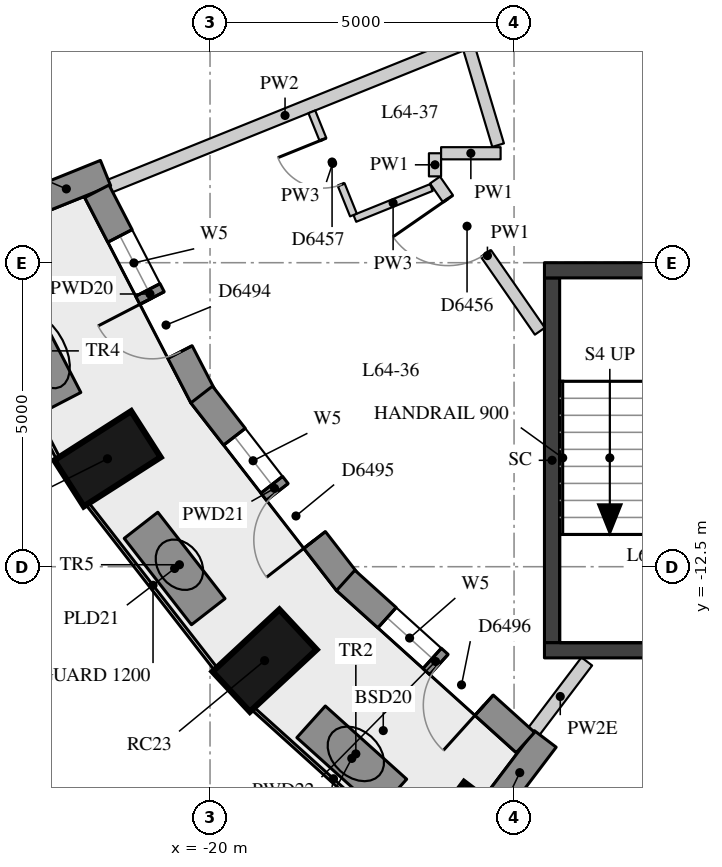
"""IFC4 building model, lengths in metres.
Left out: names, types, materials, properties, quantities, classifications, styles, units other than length and angle.
Written with IfcOpenShell. Run it as: python <this file> out.ifc"""

import sys

from ifc_helpers import new_model, si_unit, direction, frame, frame_2d, origin, origin_2d, place, context, subcontext, project, spatial, rectangle, extrude, element, fill, save


model = new_model("IFC4")
c1 = context("Model", 3, precision=1e-05, world=origin(), true_north=direction((0.0, 1.0)))
c2 = subcontext(c1, "Body", "Model", "MODEL_VIEW")
j1 = project(units=[si_unit("LENGTHUNIT", "METRE"), si_unit("PLANEANGLEUNIT", "RADIAN")], contexts=[c1])
p1 = place(None, origin())
s1 = spatial("IfcSite", under=j1, at=p1, CompositionType="ELEMENT")
p2 = place(p1, origin())
s2 = spatial("IfcBuilding", under=s1, at=p2, CompositionType="ELEMENT")
p3 = place(p2, frame((0.0, 0.0, 225.5)))
s3 = spatial("IfcBuildingStorey", under=s2, at=p3, CompositionType="ELEMENT", Elevation=225.5)
for number, where, z_axis, x_axis in (
    (1, (-21.687, -10.725, 0.0), (0.0, 0.0, 1.0), (-0.842, -0.539, 0.0)),
    (2, (-19.102, -14.045, 0.0), (0.0, 0.0, 1.0), (-0.732, -0.681, 0.0)),
    (3, (-15.916, -16.911, 0.0), (0.0, 0.0, 1.0), (-0.604, -0.797, 0.0)),
):
    element("IfcColumn", number, at=place(p3, frame(where, z_axis=z_axis, x_axis=x_axis)), inside=s3, PredefinedType="COLUMN", context=c2, shape_type="SweptSolid", body=[
        extrude(rectangle(XDim=1.5, YDim=0.9, at=origin_2d()), origin(), (0.0, 0.0, 1.0), 3.3),
    ])
p4 = place(p3, frame((-23.008, -6.546, 0.0), z_axis=(0.0, 0.0, 1.0), x_axis=(0.927346156366, 0.37420463155, 0.0)))
e4 = element("IfcWall", 4, at=p4, inside=s3, PredefinedType="SOLIDWALL", context=c2, shape_type="SweptSolid", body=[
    extrude(rectangle(XDim=1.39, YDim=0.45, at=frame_2d((0.695, 0.0))), origin(), (0.0, 0.0, 1.0), 2.85),
])
p5 = place(p3, frame((-15.326, -16.442, 0.0), z_axis=(0.0, 0.0, 1.0), x_axis=(0.603644757989, 0.797253414011, 0.0)))
e5 = element("IfcWall", 5, at=p5, inside=s3, PredefinedType="SOLIDWALL", context=c2, shape_type="SweptSolid", body=[
    extrude(rectangle(XDim=1.391, YDim=0.45, at=frame_2d((0.695, 0.0))), origin(), (0.0, 0.0, 1.0), 2.4),
])
p6 = place(p3, frame((-21.861, -6.326, 0.0), z_axis=(0.0, 0.0, 1.0), x_axis=(0.45924645187, -0.888308896975, 0.0)))
e6 = element("IfcWall", 6, at=p6, inside=s3, PredefinedType="SOLIDWALL", context=c2, shape_type="SweptSolid", body=[
    extrude(rectangle(XDim=3.802, YDim=0.45, at=frame_2d((1.901, 0.0))), origin(), (0.0, 0.0, 1.0), 2.85),
])
p7 = place(p6, frame((0.826, 0.0, 0.4)))
e7 = element("IfcOpeningElement", 7, at=p7, cuts=e6, PredefinedType="OPENING", context=c2, shape_type="SweptSolid", body=[
    extrude(rectangle(XDim=1.0, YDim=1.75, at=frame_2d((0.5, 0.875))), frame((0.0, 0.235, 0.0), z_axis=(0.0, -1.0, 0.0), x_axis=(1.0, 0.0, 0.0)), (0.0, 0.0, 1.0), 0.47),
])
p8 = place(p6, frame((1.976, 0.0, 0.0)))
e8 = element("IfcOpeningElement", 8, at=p8, cuts=e6, PredefinedType="OPENING", context=c2, shape_type="SweptSolid", body=[
    extrude(rectangle(XDim=1.0, YDim=2.15, at=frame_2d((0.5, 1.075))), frame((0.0, 0.235, 0.0), z_axis=(0.0, -1.0, 0.0), x_axis=(1.0, 0.0, 0.0)), (0.0, 0.0, 1.0), 0.47),
])
p9 = place(p3, frame((-20.137, -9.668, 0.0), z_axis=(0.0, 0.0, 1.0), x_axis=(0.613157177014, -0.789960933386, 0.0)))
e9 = element("IfcWall", 9, at=p9, inside=s3, PredefinedType="SOLIDWALL", context=c2, shape_type="SweptSolid", body=[
    extrude(rectangle(XDim=3.906, YDim=0.45, at=frame_2d((1.953, 0.0))), origin(), (0.0, 0.0, 1.0), 2.85),
])
p10 = place(p9, frame((0.878, 0.0, 0.4)))
e10 = element("IfcOpeningElement", 10, at=p10, cuts=e9, PredefinedType="OPENING", context=c2, shape_type="SweptSolid", body=[
    extrude(rectangle(XDim=1.0, YDim=1.75, at=frame_2d((0.5, 0.875))), frame((0.0, 0.235, 0.0), z_axis=(0.0, -1.0, 0.0), x_axis=(1.0, 0.0, 0.0)), (0.0, 0.0, 1.0), 0.47),
])
p11 = place(p9, frame((2.028, 0.0, 0.0)))
e11 = element("IfcOpeningElement", 11, at=p11, cuts=e9, PredefinedType="OPENING", context=c2, shape_type="SweptSolid", body=[
    extrude(rectangle(XDim=1.0, YDim=2.15, at=frame_2d((0.5, 1.075))), frame((0.0, 0.235, 0.0), z_axis=(0.0, -1.0, 0.0), x_axis=(1.0, 0.0, 0.0)), (0.0, 0.0, 1.0), 0.47),
])
p12 = place(p3, frame((-17.769, -12.725, 0.0), z_axis=(0.0, 0.0, 1.0), x_axis=(0.742485377568, -0.669862272484, 0.0)))
e12 = element("IfcWall", 12, at=p12, inside=s3, PredefinedType="SOLIDWALL", context=c2, shape_type="SweptSolid", body=[
    extrude(rectangle(XDim=3.98, YDim=0.45, at=frame_2d((1.99, 0.0))), origin(), (0.0, 0.0, 1.0), 2.85),
])
p13 = place(p12, frame((0.915, 0.0, 0.4)))
e13 = element("IfcOpeningElement", 13, at=p13, cuts=e12, PredefinedType="OPENING", context=c2, shape_type="SweptSolid", body=[
    extrude(rectangle(XDim=1.0, YDim=1.75, at=frame_2d((0.5, 0.875))), frame((0.0, 0.235, 0.0), z_axis=(0.0, -1.0, 0.0), x_axis=(1.0, 0.0, 0.0)), (0.0, 0.0, 1.0), 0.47),
])
p14 = place(p12, frame((2.065, 0.0, 0.0)))
e14 = element("IfcOpeningElement", 14, at=p14, cuts=e12, PredefinedType="OPENING", context=c2, shape_type="SweptSolid", body=[
    extrude(rectangle(XDim=1.0, YDim=2.15, at=frame_2d((0.5, 1.075))), frame((0.0, 0.235, 0.0), z_axis=(0.0, -1.0, 0.0), x_axis=(1.0, 0.0, 0.0)), (0.0, 0.0, 1.0), 0.47),
])
for number, where, z_axis, x_axis in (
    (15, (-23.264, -8.197, 0.0), (0.0, 0.0, 1.0), (0.46, -0.888, 0.0)),
    (16, (-21.135, -11.819, 0.0), (0.0, 0.0, 1.0), (0.614, -0.789, 0.0)),
    (17, (-18.338, -15.051, 0.0), (0.0, 0.0, 1.0), (0.743, -0.669, 0.0)),
):
    element("IfcWall", number, at=place(p3, frame(where, z_axis=z_axis, x_axis=x_axis)), inside=s3, PredefinedType="USERDEFINED", context=c2, shape_type="SweptSolid", body=[
        extrude(rectangle(XDim=1.8, YDim=0.7, at=frame_2d((0.9, 0.0))), origin(), (0.0, 0.0, 1.0), 0.75),
    ])
p15 = place(p3, frame((-14.375, -13.75, -0.28), z_axis=(0.0, 0.0, 1.0), x_axis=(0.0, 1.0, 0.0)))
e18 = element("IfcWall", 18, at=p15, inside=s3, PredefinedType="SHEAR", context=c2, shape_type="SweptSolid", body=[
    extrude(rectangle(XDim=6.0, YDim=0.25, at=frame_2d((3.0, 0.0))), origin(), (0.0, 0.0, 1.0), 3.13),
])
for number, where, z_axis, x_axis in (
    (19, (-14.5, -7.625, -0.28), (0.0, 0.0, 1.0), (1.0, 0.0, 0.0)),
    (20, (-14.5, -13.875, -0.28), (0.0, 0.0, 1.0), (1.0, 0.0, 0.0)),
):
    element("IfcWall", number, at=place(p3, frame(where, z_axis=z_axis, x_axis=x_axis)), inside=s3, PredefinedType="SHEAR", context=c2, shape_type="SweptSolid", body=[
        extrude(rectangle(XDim=5.2, YDim=0.25, at=frame_2d((2.6, 0.0))), origin(), (0.0, 0.0, 1.0), 3.13),
    ])
p16 = place(p3, frame((-14.575, -8.627, 0.0), z_axis=(0.0, 0.0, 1.0), x_axis=(-0.569910381143, 0.821706856163, 0.0)))
e21 = element("IfcWall", 21, at=p16, inside=s3, PredefinedType="PARTITIONING", context=c2, shape_type="SweptSolid", body=[
    extrude(rectangle(XDim=3.026, YDim=0.2, at=frame_2d((1.513, 0.0))), origin(), (0.0, 0.0, 1.0), 2.85),
])
p17 = place(p16, frame((1.552, 0.0, 0.0)))
e22 = element("IfcOpeningElement", 22, at=p17, cuts=e21, PredefinedType="OPENING", context=c2, shape_type="SweptSolid", body=[
    extrude(rectangle(XDim=1.1, YDim=2.1, at=frame_2d((0.55, 1.05))), frame((0.0, 0.11, 0.0), z_axis=(0.0, -1.0, 0.0), x_axis=(1.0, 0.0, 0.0)), (0.0, 0.0, 1.0), 0.22),
])
p18 = place(p3, frame((-16.3, -6.08, 0.0), z_axis=(0.0, 0.0, 1.0), x_axis=(0.0, 1.0, 0.0)))
e23 = element("IfcWall", 23, at=p18, inside=s3, PredefinedType="PARTITIONING", context=c2, shape_type="SweptSolid", body=[
    extrude(rectangle(XDim=0.38, YDim=0.2, at=frame_2d((0.19, 0.0))), origin(), (0.0, 0.0, 1.0), 2.85),
])
p19 = place(p3, frame((-16.2, -5.7, 0.0), z_axis=(0.0, 0.0, 1.0), x_axis=(1.0, 0.0, 0.0)))
e24 = element("IfcWall", 24, at=p19, inside=s3, PredefinedType="PARTITIONING", context=c2, shape_type="SweptSolid", body=[
    extrude(rectangle(XDim=0.979, YDim=0.2, at=frame_2d((0.489, 0.0))), origin(), (0.0, 0.0, 1.0), 2.85),
])
p20 = place(p3, frame((-15.262, -5.567, 0.0), z_axis=(0.0, 0.0, 1.0), x_axis=(-0.28704593875, 0.957916817395, 0.0)))
e25 = element("IfcWall", 25, at=p20, inside=s3, PredefinedType="PARTITIONING", context=c2, shape_type="SweptSolid", body=[
    extrude(rectangle(XDim=6.751, YDim=0.2, at=frame_2d((3.375, 0.0))), origin(), (0.0, 0.0, 1.0), 2.85),
])
p21 = place(p20, frame((3.259, 0.0, 0.0)))
e26 = element("IfcOpeningElement", 26, at=p21, cuts=e25, PredefinedType="OPENING", context=c2, shape_type="SweptSolid", body=[
    extrude(rectangle(XDim=1.1, YDim=2.1, at=frame_2d((0.55, 1.05))), frame((0.0, 0.11, 0.0), z_axis=(0.0, -1.0, 0.0), x_axis=(1.0, 0.0, 0.0)), (0.0, 0.0, 1.0), 0.22),
])
p22 = place(p3, frame((-21.651, -6.241, 0.0), z_axis=(0.0, 0.0, 1.0), x_axis=(0.927390089179, 0.37409573974, 0.0)))
e27 = element("IfcWall", 27, at=p22, inside=s3, PredefinedType="PARTITIONING", context=c2, shape_type="SweptSolid", body=[
    extrude(rectangle(XDim=6.221, YDim=0.22, at=frame_2d((3.11, 0.0))), origin(), (0.0, 0.0, 1.0), 2.85),
])
p23 = place(p3, frame((-14.677, -15.211, 0.0), z_axis=(0.0, 0.0, 1.0), x_axis=(0.60355868562, 0.797318576864, 0.0)))
e28 = element("IfcWall", 28, at=p23, inside=s3, PredefinedType="PARTITIONING", context=c2, shape_type="SweptSolid", body=[
    extrude(rectangle(XDim=1.447, YDim=0.22, at=frame_2d((0.723, 0.0))), origin(), (0.0, 0.0, 1.0), 2.4),
])
p24 = place(p3, frame((-16.36, -6.264, 0.0), z_axis=(0.0, 0.0, 1.0), x_axis=(-0.927381089245, -0.374118049967, 0.0)))
e29 = element("IfcWall", 29, at=p24, inside=s3, PredefinedType="PARTITIONING", context=c2, shape_type="SweptSolid", body=[
    extrude(rectangle(XDim=1.357, YDim=0.12, at=frame_2d((0.679, 0.0))), origin(), (0.0, 0.0, 1.0), 2.85),
])
p25 = place(p3, frame((-17.641, -6.716, 0.0), z_axis=(0.0, 0.0, 1.0), x_axis=(-0.374103450988, 0.927386978536, 0.0)))
e30 = element("IfcWall", 30, at=p25, inside=s3, PredefinedType="PARTITIONING", context=c2, shape_type="SweptSolid", body=[
    extrude(rectangle(XDim=1.83, YDim=0.12, at=frame_2d((0.915, 0.0))), origin(), (0.0, 0.0, 1.0), 2.85),
])
p26 = place(p25, frame((0.54, 0.0, 0.0)))
e31 = element("IfcOpeningElement", 31, at=p26, cuts=e30, PredefinedType="OPENING", context=c2, shape_type="SweptSolid", body=[
    extrude(rectangle(XDim=0.8, YDim=2.1, at=frame_2d((0.4, 1.05))), frame((0.0, 0.07, 0.0), z_axis=(0.0, -1.0, 0.0), x_axis=(1.0, 0.0, 0.0)), (0.0, 0.0, 1.0), 0.14),
])
p27 = place(p7, origin())
e32 = element("IfcWindow", 32, at=p27, inside=s3, PartitioningType="SINGLE_PANEL", PredefinedType="WINDOW", context=c2, shape_type="SweptSolid", body=[
    extrude(rectangle(XDim=1.0, YDim=1.75, at=frame_2d((0.5, 0.875))), frame((0.0, 0.035, 0.0), z_axis=(0.0, -1.0, 0.0), x_axis=(1.0, 0.0, 0.0)), (0.0, 0.0, 1.0), 0.06),
])
fill(e7, e32)
p28 = place(p8, frame((1.0, 0.0, 0.0), z_axis=(0.0, 0.0, 1.0), x_axis=(-1.0, 0.0, 0.0)))
e33 = element("IfcDoor", 33, at=p28, inside=s3, OperationType="SINGLE_SWING_RIGHT", PredefinedType="DOOR", context=c2, shape_type="SweptSolid", body=[
    extrude(rectangle(XDim=1.0, YDim=2.15, at=frame_2d((0.5, 1.075))), frame((0.0, 0.075, 0.0), z_axis=(0.0, -1.0, 0.0), x_axis=(1.0, 0.0, 0.0)), (0.0, 0.0, 1.0), 0.05),
])
fill(e8, e33)
p29 = place(p10, origin())
e34 = element("IfcWindow", 34, at=p29, inside=s3, PartitioningType="SINGLE_PANEL", PredefinedType="WINDOW", context=c2, shape_type="SweptSolid", body=[
    extrude(rectangle(XDim=1.0, YDim=1.75, at=frame_2d((0.5, 0.875))), frame((0.0, 0.035, 0.0), z_axis=(0.0, -1.0, 0.0), x_axis=(1.0, 0.0, 0.0)), (0.0, 0.0, 1.0), 0.06),
])
fill(e10, e34)
p30 = place(p11, frame((1.0, 0.0, 0.0), z_axis=(0.0, 0.0, 1.0), x_axis=(-1.0, 0.0, 0.0)))
e35 = element("IfcDoor", 35, at=p30, inside=s3, OperationType="SINGLE_SWING_LEFT", PredefinedType="DOOR", context=c2, shape_type="SweptSolid", body=[
    extrude(rectangle(XDim=1.0, YDim=2.15, at=frame_2d((0.5, 1.075))), frame((0.0, 0.075, 0.0), z_axis=(0.0, -1.0, 0.0), x_axis=(1.0, 0.0, 0.0)), (0.0, 0.0, 1.0), 0.05),
])
fill(e11, e35)
p31 = place(p13, origin())
e36 = element("IfcWindow", 36, at=p31, inside=s3, PartitioningType="SINGLE_PANEL", PredefinedType="WINDOW", context=c2, shape_type="SweptSolid", body=[
    extrude(rectangle(XDim=1.0, YDim=1.75, at=frame_2d((0.5, 0.875))), frame((0.0, 0.035, 0.0), z_axis=(0.0, -1.0, 0.0), x_axis=(1.0, 0.0, 0.0)), (0.0, 0.0, 1.0), 0.06),
])
fill(e13, e36)
p32 = place(p14, frame((1.0, 0.0, 0.0), z_axis=(0.0, 0.0, 1.0), x_axis=(-1.0, 0.0, 0.0)))
e37 = element("IfcDoor", 37, at=p32, inside=s3, OperationType="SINGLE_SWING_LEFT", PredefinedType="DOOR", context=c2, shape_type="SweptSolid", body=[
    extrude(rectangle(XDim=1.0, YDim=2.15, at=frame_2d((0.5, 1.075))), frame((0.0, 0.075, 0.0), z_axis=(0.0, -1.0, 0.0), x_axis=(1.0, 0.0, 0.0)), (0.0, 0.0, 1.0), 0.05),
])
fill(e14, e37)
p33 = place(p17, origin())
e38 = element("IfcDoor", 38, at=p33, inside=s3, OperationType="SINGLE_SWING_RIGHT", PredefinedType="DOOR", context=c2, shape_type="SweptSolid", body=[
    extrude(rectangle(XDim=1.1, YDim=2.1, at=frame_2d((0.55, 1.05))), frame((0.0, 0.025, 0.0), z_axis=(0.0, -1.0, 0.0), x_axis=(1.0, 0.0, 0.0)), (0.0, 0.0, 1.0), 0.05),
])
fill(e22, e38)
p34 = place(p26, origin())
e39 = element("IfcDoor", 39, at=p34, inside=s3, OperationType="SINGLE_SWING_RIGHT", PredefinedType="DOOR", context=c2, shape_type="SweptSolid", body=[
    extrude(rectangle(XDim=0.8, YDim=2.1, at=frame_2d((0.4, 1.05))), frame((0.0, 0.025, 0.0), z_axis=(0.0, -1.0, 0.0), x_axis=(1.0, 0.0, 0.0)), (0.0, 0.0, 1.0), 0.05),
])
fill(e31, e39)
save(model, sys.argv[1])
